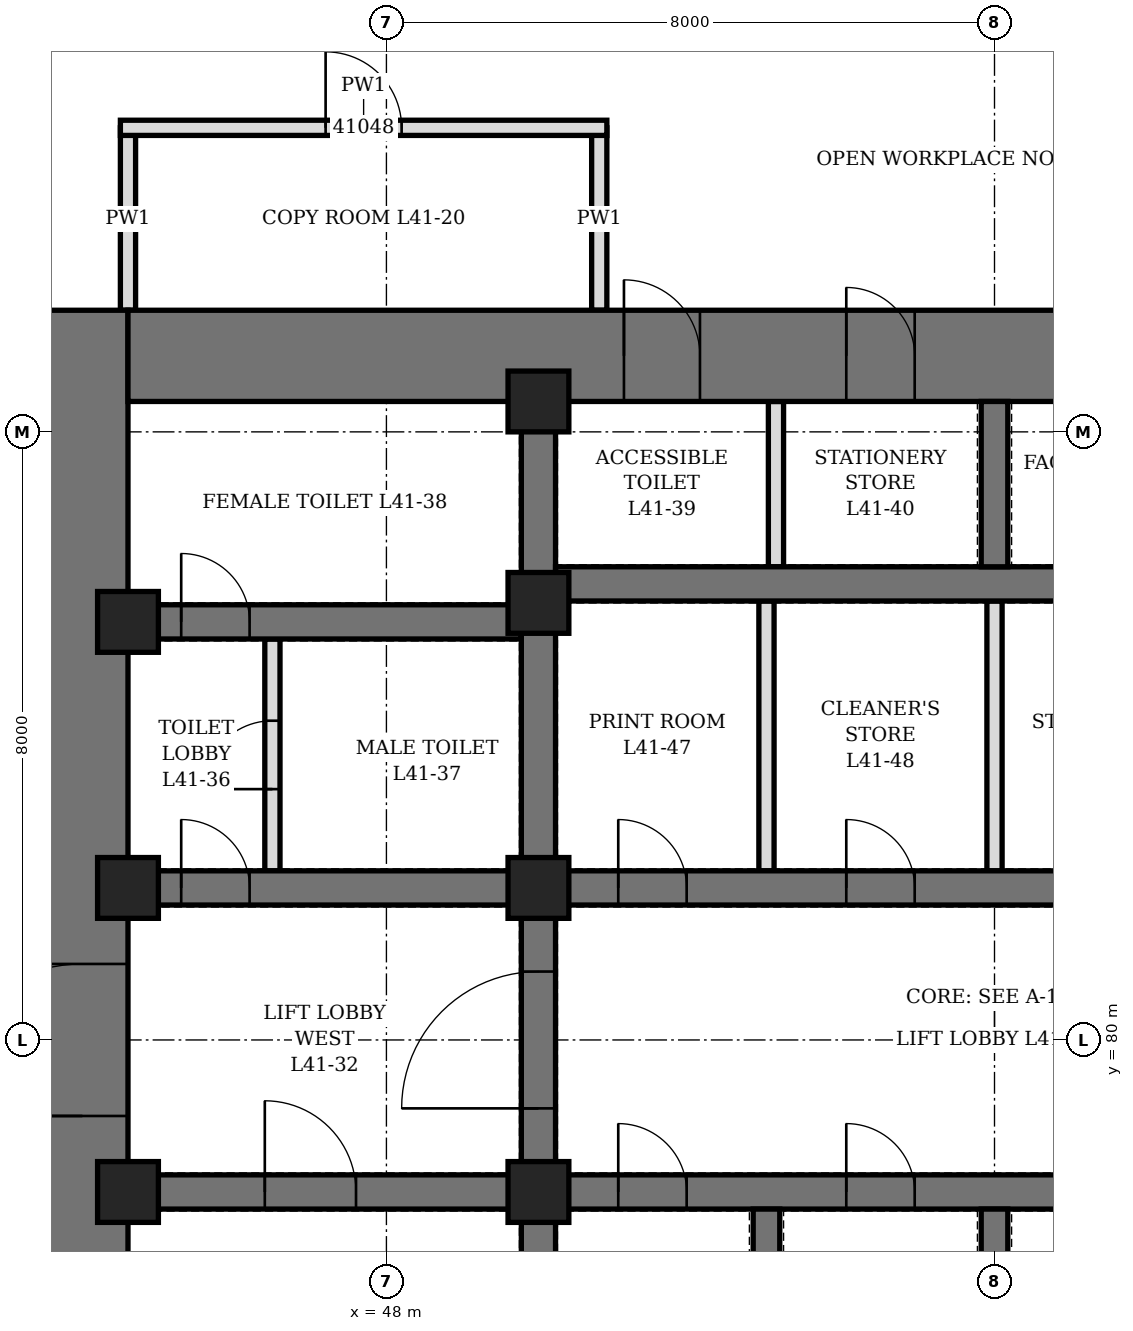
"""IFC4 building model, lengths in metres.
Left out: names, types, materials, properties, quantities, classifications, styles, units other than length and angle.
Written with IfcOpenShell. Run it as: python <this file> out.ifc"""

import sys

from ifc_helpers import new_model, si_unit, direction, frame, frame_2d, origin, origin_2d, place, context, subcontext, project, spatial, rectangle, hollow_rectangle, extrude, element, fill, save


model = new_model("IFC4")
c1 = context("Model", 3, precision=1e-05, world=origin(), true_north=direction((0.0, 1.0)))
c2 = subcontext(c1, "Body", "Model", "MODEL_VIEW")
j1 = project(units=[si_unit("LENGTHUNIT", "METRE"), si_unit("PLANEANGLEUNIT", "RADIAN")], contexts=[c1])
p1 = place(None, origin())
s1 = spatial("IfcSite", under=j1, at=p1, CompositionType="ELEMENT")
p2 = place(p1, origin())
s2 = spatial("IfcBuilding", under=s1, at=p2, CompositionType="ELEMENT")
p3 = place(p2, frame((0.0, 0.0, 185.5)))
s3 = spatial("IfcBuildingStorey", under=s2, at=p3, CompositionType="ELEMENT", Elevation=185.5)
p4 = place(p3, frame((44.0, 70.4, 0.0), z_axis=(0.0, 0.0, 1.0), x_axis=(0.0, 1.0, 0.0)))
e1 = element("IfcWall", 1, at=p4, inside=s3, PredefinedType="SHEAR", context=c2, shape_type="SweptSolid", body=[
    extrude(rectangle(XDim=19.2, YDim=1.2, at=frame_2d((9.6, 0.0))), origin(), (0.0, 0.0, 1.0), 4.2),
])
p5 = place(p4, frame((8.6, 0.0, 0.0)))
e2 = element("IfcOpeningElement", 2, at=p5, cuts=e1, PredefinedType="OPENING", context=c2, shape_type="SweptSolid", body=[
    extrude(rectangle(XDim=2.0, YDim=2.4, at=frame_2d((1.0, 1.2))), frame((0.0, 0.61, 0.0), z_axis=(0.0, -1.0, 0.0), x_axis=(1.0, 0.0, 0.0)), (0.0, 0.0, 1.0), 1.22),
])
p6 = place(p3, frame((44.6, 89.0, 0.0), z_axis=(0.0, 0.0, 1.0), x_axis=(1.0, 0.0, 0.0)))
e3 = element("IfcWall", 3, at=p6, inside=s3, PredefinedType="SHEAR", context=c2, shape_type="SweptSolid", body=[
    extrude(rectangle(XDim=22.8, YDim=1.2, at=frame_2d((11.4, 0.0))), origin(), (0.0, 0.0, 1.0), 4.2),
])
p7 = place(p6, frame((6.525, 0.0, 0.0)))
e4 = element("IfcOpeningElement", 4, at=p7, cuts=e3, PredefinedType="OPENING", context=c2, shape_type="SweptSolid", body=[
    extrude(rectangle(XDim=1.0, YDim=2.1, at=frame_2d((0.5, 1.05))), frame((0.0, 0.61, 0.0), z_axis=(0.0, -1.0, 0.0), x_axis=(1.0, 0.0, 0.0)), (0.0, 0.0, 1.0), 1.22),
])
p8 = place(p6, frame((9.45, 0.0, 0.0)))
e5 = element("IfcOpeningElement", 5, at=p8, cuts=e3, PredefinedType="OPENING", context=c2, shape_type="SweptSolid", body=[
    extrude(rectangle(XDim=0.9, YDim=2.1, at=frame_2d((0.45, 1.05))), frame((0.0, 0.61, 0.0), z_axis=(0.0, -1.0, 0.0), x_axis=(1.0, 0.0, 0.0)), (0.0, 0.0, 1.0), 1.22),
])
p9 = place(p6, frame((13.012, 0.0, 0.0)))
e6 = element("IfcOpeningElement", 6, at=p9, cuts=e3, PredefinedType="OPENING", context=c2, shape_type="SweptSolid", body=[
    extrude(rectangle(XDim=0.9, YDim=2.1, at=frame_2d((0.45, 1.05))), frame((0.0, 0.61, 0.0), z_axis=(0.0, -1.0, 0.0), x_axis=(1.0, 0.0, 0.0)), (0.0, 0.0, 1.0), 1.22),
])
p10 = place(p3, frame((50.0, 71.6, 0.0), z_axis=(0.0, 0.0, 1.0), x_axis=(0.0, 1.0, 0.0)))
e7 = element("IfcWall", 7, at=p10, inside=s3, PredefinedType="SHEAR", context=c2, shape_type="SweptSolid", body=[
    extrude(rectangle(XDim=16.8, YDim=0.45, at=frame_2d((8.4, 0.0))), origin(), (0.0, 0.0, 1.0), 4.2),
])
p11 = place(p10, frame((7.5, 0.0, 0.0)))
e8 = element("IfcOpeningElement", 8, at=p11, cuts=e7, PredefinedType="OPENING", context=c2, shape_type="SweptSolid", body=[
    extrude(rectangle(XDim=1.8, YDim=2.4, at=frame_2d((0.9, 1.2))), frame((0.0, 0.235, 0.0), z_axis=(0.0, -1.0, 0.0), x_axis=(1.0, 0.0, 0.0)), (0.0, 0.0, 1.0), 0.47),
])
p12 = place(p3, frame((44.6, 78.0, 0.0), z_axis=(0.0, 0.0, 1.0), x_axis=(1.0, 0.0, 0.0)))
e9 = element("IfcWall", 9, at=p12, inside=s3, PredefinedType="SHEAR", context=c2, shape_type="SweptSolid", body=[
    extrude(rectangle(XDim=5.175, YDim=0.45, at=frame_2d((2.587, 0.0))), origin(), (0.0, 0.0, 1.0), 4.2),
])
p13 = place(p12, frame((1.8, 0.0, 0.0)))
e10 = element("IfcOpeningElement", 10, at=p13, cuts=e9, PredefinedType="OPENING", context=c2, shape_type="SweptSolid", body=[
    extrude(rectangle(XDim=1.2, YDim=2.1, at=frame_2d((0.6, 1.05))), frame((0.0, 0.235, 0.0), z_axis=(0.0, -1.0, 0.0), x_axis=(1.0, 0.0, 0.0)), (0.0, 0.0, 1.0), 0.47),
])
p14 = place(p3, frame((44.6, 82.0, 0.0), z_axis=(0.0, 0.0, 1.0), x_axis=(1.0, 0.0, 0.0)))
e11 = element("IfcWall", 11, at=p14, inside=s3, PredefinedType="SHEAR", context=c2, shape_type="SweptSolid", body=[
    extrude(rectangle(XDim=5.175, YDim=0.45, at=frame_2d((2.587, 0.0))), origin(), (0.0, 0.0, 1.0), 4.2),
])
p15 = place(p14, frame((0.7, 0.0, 0.0)))
e12 = element("IfcOpeningElement", 12, at=p15, cuts=e11, PredefinedType="OPENING", context=c2, shape_type="SweptSolid", body=[
    extrude(rectangle(XDim=0.9, YDim=2.1, at=frame_2d((0.45, 1.05))), frame((0.0, 0.235, 0.0), z_axis=(0.0, -1.0, 0.0), x_axis=(1.0, 0.0, 0.0)), (0.0, 0.0, 1.0), 0.47),
])
p16 = place(p3, frame((44.6, 85.5, 0.0), z_axis=(0.0, 0.0, 1.0), x_axis=(1.0, 0.0, 0.0)))
e13 = element("IfcWall", 13, at=p16, inside=s3, PredefinedType="SHEAR", context=c2, shape_type="SweptSolid", body=[
    extrude(rectangle(XDim=5.175, YDim=0.45, at=frame_2d((2.587, 0.0))), origin(), (0.0, 0.0, 1.0), 4.2),
])
p17 = place(p16, frame((0.7, 0.0, 0.0)))
e14 = element("IfcOpeningElement", 14, at=p17, cuts=e13, PredefinedType="OPENING", context=c2, shape_type="SweptSolid", body=[
    extrude(rectangle(XDim=0.9, YDim=2.1, at=frame_2d((0.45, 1.05))), frame((0.0, 0.235, 0.0), z_axis=(0.0, -1.0, 0.0), x_axis=(1.0, 0.0, 0.0)), (0.0, 0.0, 1.0), 0.47),
])
p18 = place(p3, frame((50.225, 78.0, 0.0), z_axis=(0.0, 0.0, 1.0), x_axis=(1.0, 0.0, 0.0)))
e15 = element("IfcWall", 15, at=p18, inside=s3, PredefinedType="SHEAR", context=c2, shape_type="SweptSolid", body=[
    extrude(rectangle(XDim=11.55, YDim=0.45, at=frame_2d((5.775, 0.0))), origin(), (0.0, 0.0, 1.0), 4.2),
])
p19 = place(p18, frame((0.825, 0.0, 0.0)))
e16 = element("IfcOpeningElement", 16, at=p19, cuts=e15, PredefinedType="OPENING", context=c2, shape_type="SweptSolid", body=[
    extrude(rectangle(XDim=0.9, YDim=2.1, at=frame_2d((0.45, 1.05))), frame((0.0, 0.235, 0.0), z_axis=(0.0, -1.0, 0.0), x_axis=(1.0, 0.0, 0.0)), (0.0, 0.0, 1.0), 0.47),
])
p20 = place(p18, frame((3.825, 0.0, 0.0)))
e17 = element("IfcOpeningElement", 17, at=p20, cuts=e15, PredefinedType="OPENING", context=c2, shape_type="SweptSolid", body=[
    extrude(rectangle(XDim=0.9, YDim=2.1, at=frame_2d((0.45, 1.05))), frame((0.0, 0.235, 0.0), z_axis=(0.0, -1.0, 0.0), x_axis=(1.0, 0.0, 0.0)), (0.0, 0.0, 1.0), 0.47),
])
p21 = place(p18, frame((6.825, 0.0, 0.0)))
e18 = element("IfcOpeningElement", 18, at=p21, cuts=e15, PredefinedType="OPENING", context=c2, shape_type="SweptSolid", body=[
    extrude(rectangle(XDim=0.9, YDim=2.1, at=frame_2d((0.45, 1.05))), frame((0.0, 0.235, 0.0), z_axis=(0.0, -1.0, 0.0), x_axis=(1.0, 0.0, 0.0)), (0.0, 0.0, 1.0), 0.47),
])
p22 = place(p18, frame((9.825, 0.0, 0.0)))
e19 = element("IfcOpeningElement", 19, at=p22, cuts=e15, PredefinedType="OPENING", context=c2, shape_type="SweptSolid", body=[
    extrude(rectangle(XDim=0.9, YDim=2.1, at=frame_2d((0.45, 1.05))), frame((0.0, 0.235, 0.0), z_axis=(0.0, -1.0, 0.0), x_axis=(1.0, 0.0, 0.0)), (0.0, 0.0, 1.0), 0.47),
])
p23 = place(p3, frame((50.225, 82.0, 0.0), z_axis=(0.0, 0.0, 1.0), x_axis=(1.0, 0.0, 0.0)))
e20 = element("IfcWall", 20, at=p23, inside=s3, PredefinedType="SHEAR", context=c2, shape_type="SweptSolid", body=[
    extrude(rectangle(XDim=11.55, YDim=0.45, at=frame_2d((5.775, 0.0))), origin(), (0.0, 0.0, 1.0), 4.2),
])
p24 = place(p23, frame((0.825, 0.0, 0.0)))
e21 = element("IfcOpeningElement", 21, at=p24, cuts=e20, PredefinedType="OPENING", context=c2, shape_type="SweptSolid", body=[
    extrude(rectangle(XDim=0.9, YDim=2.1, at=frame_2d((0.45, 1.05))), frame((0.0, 0.235, 0.0), z_axis=(0.0, -1.0, 0.0), x_axis=(1.0, 0.0, 0.0)), (0.0, 0.0, 1.0), 0.47),
])
p25 = place(p23, frame((3.825, 0.0, 0.0)))
e22 = element("IfcOpeningElement", 22, at=p25, cuts=e20, PredefinedType="OPENING", context=c2, shape_type="SweptSolid", body=[
    extrude(rectangle(XDim=0.9, YDim=2.1, at=frame_2d((0.45, 1.05))), frame((0.0, 0.235, 0.0), z_axis=(0.0, -1.0, 0.0), x_axis=(1.0, 0.0, 0.0)), (0.0, 0.0, 1.0), 0.47),
])
p26 = place(p23, frame((6.825, 0.0, 0.0)))
e23 = element("IfcOpeningElement", 23, at=p26, cuts=e20, PredefinedType="OPENING", context=c2, shape_type="SweptSolid", body=[
    extrude(rectangle(XDim=0.9, YDim=2.1, at=frame_2d((0.45, 1.05))), frame((0.0, 0.235, 0.0), z_axis=(0.0, -1.0, 0.0), x_axis=(1.0, 0.0, 0.0)), (0.0, 0.0, 1.0), 0.47),
])
p27 = place(p23, frame((9.825, 0.0, 0.0)))
e24 = element("IfcOpeningElement", 24, at=p27, cuts=e20, PredefinedType="OPENING", context=c2, shape_type="SweptSolid", body=[
    extrude(rectangle(XDim=0.9, YDim=2.1, at=frame_2d((0.45, 1.05))), frame((0.0, 0.235, 0.0), z_axis=(0.0, -1.0, 0.0), x_axis=(1.0, 0.0, 0.0)), (0.0, 0.0, 1.0), 0.47),
])
p28 = place(p3, frame((50.225, 86.0, 0.0), z_axis=(0.0, 0.0, 1.0), x_axis=(1.0, 0.0, 0.0)))
e25 = element("IfcWall", 25, at=p28, inside=s3, PredefinedType="SHEAR", context=c2, shape_type="SweptSolid", body=[
    extrude(rectangle(XDim=11.55, YDim=0.45, at=frame_2d((5.775, 0.0))), origin(), (0.0, 0.0, 1.0), 4.2),
])
for number, where, z_axis, x_axis in (
    (26, (53.0, 74.175, 0.0), (0.0, 0.0, 1.0), (0.0, 1.0, 0.0)),
    (27, (56.0, 74.175, 0.0), (0.0, 0.0, 1.0), (0.0, 1.0, 0.0)),
):
    element("IfcWall", number, at=place(p3, frame(where, z_axis=z_axis, x_axis=x_axis)), inside=s3, PredefinedType="SHEAR", context=c2, shape_type="SweptSolid", body=[
        extrude(rectangle(XDim=3.6, YDim=0.35, at=frame_2d((1.8, 0.0))), origin(), (0.0, 0.0, 1.0), 4.2),
    ])
p29 = place(p3, frame((56.0, 86.225, 0.0), z_axis=(0.0, 0.0, 1.0), x_axis=(0.0, 1.0, 0.0)))
e28 = element("IfcWall", 28, at=p29, inside=s3, PredefinedType="SHEAR", context=c2, shape_type="SweptSolid", body=[
    extrude(rectangle(XDim=2.175, YDim=0.35, at=frame_2d((1.087, 0.0))), origin(), (0.0, 0.0, 1.0), 4.2),
])
for number, where, z_axis, x_axis in (
    (29, (44.6, 78.0, 0.0), (0.0, 0.0, 1.0), (1.0, 0.0, 0.0)),
    (30, (44.6, 82.0, 0.0), (0.0, 0.0, 1.0), (1.0, 0.0, 0.0)),
    (31, (44.6, 85.5, 0.0), (0.0, 0.0, 1.0), (1.0, 0.0, 0.0)),
    (32, (50.0, 78.0, 0.0), (0.0, 0.0, 1.0), (1.0, 0.0, 0.0)),
    (33, (50.0, 82.0, 0.0), (0.0, 0.0, 1.0), (1.0, 0.0, 0.0)),
    (34, (50.0, 85.75, 0.0), (0.0, 0.0, 1.0), (1.0, 0.0, 0.0)),
    (35, (50.0, 88.4, 0.0), (0.0, 0.0, 1.0), (1.0, 0.0, 0.0)),
):
    element("IfcColumn", number, at=place(p3, frame(where, z_axis=z_axis, x_axis=x_axis)), inside=s3, PredefinedType="COLUMN", context=c2, shape_type="SweptSolid", body=[
        extrude(hollow_rectangle(XDim=0.8, YDim=0.8, WallThickness=0.1, at=origin_2d()), origin(), (0.0, 0.0, 1.0), 4.2),
    ])
p30 = place(p3, frame((46.5, 82.225, 0.0), z_axis=(0.0, 0.0, 1.0), x_axis=(0.0, 1.0, 0.0)))
e36 = element("IfcWall", 36, at=p30, inside=s3, PredefinedType="PARTITIONING", context=c2, shape_type="SweptSolid", body=[
    extrude(rectangle(XDim=3.05, YDim=0.2, at=frame_2d((1.525, 0.0))), origin(), (0.0, 0.0, 1.0), 4.04),
])
p31 = place(p30, frame((1.075, 0.0, 0.0)))
e37 = element("IfcOpeningElement", 37, at=p31, cuts=e36, PredefinedType="OPENING", context=c2, shape_type="SweptSolid", body=[
    extrude(rectangle(XDim=0.9, YDim=2.1, at=frame_2d((0.45, 1.05))), frame((0.0, 0.11, 0.0), z_axis=(0.0, -1.0, 0.0), x_axis=(1.0, 0.0, 0.0)), (0.0, 0.0, 1.0), 0.22),
])
p32 = place(p3, frame((53.125, 86.225, 0.0), z_axis=(0.0, 0.0, 1.0), x_axis=(0.0, 1.0, 0.0)))
e38 = element("IfcWall", 38, at=p32, inside=s3, PredefinedType="PARTITIONING", context=c2, shape_type="SweptSolid", body=[
    extrude(rectangle(XDim=2.175, YDim=0.2, at=frame_2d((1.087, 0.0))), origin(), (0.0, 0.0, 1.0), 4.04),
])
p33 = place(p3, frame((53.0, 82.225, 0.0), z_axis=(0.0, 0.0, 1.0), x_axis=(0.0, 1.0, 0.0)))
e39 = element("IfcWall", 39, at=p33, inside=s3, PredefinedType="PARTITIONING", context=c2, shape_type="SweptSolid", body=[
    extrude(rectangle(XDim=3.55, YDim=0.2, at=frame_2d((1.775, 0.0))), origin(), (0.0, 0.0, 1.0), 4.04),
])
p34 = place(p3, frame((56.0, 82.225, 0.0), z_axis=(0.0, 0.0, 1.0), x_axis=(0.0, 1.0, 0.0)))
e40 = element("IfcWall", 40, at=p34, inside=s3, PredefinedType="PARTITIONING", context=c2, shape_type="SweptSolid", body=[
    extrude(rectangle(XDim=3.55, YDim=0.2, at=frame_2d((1.775, 0.0))), origin(), (0.0, 0.0, 1.0), 2.54),
])
for number, where, z_axis, x_axis in (
    (41, (44.6, 89.6, 0.0), (0.0, 0.0, 1.0), (0.0, 1.0, 0.0)),
    (42, (50.8, 89.6, 0.0), (0.0, 0.0, 1.0), (0.0, 1.0, 0.0)),
):
    element("IfcWall", number, at=place(p3, frame(where, z_axis=z_axis, x_axis=x_axis)), inside=s3, PredefinedType="PARTITIONING", context=c2, shape_type="SweptSolid", body=[
        extrude(rectangle(XDim=2.4, YDim=0.2, at=frame_2d((1.2, 0.0))), origin(), (0.0, 0.0, 1.0), 4.04),
    ])
p35 = place(p3, frame((44.5, 92.0, 0.0), z_axis=(0.0, 0.0, 1.0), x_axis=(1.0, 0.0, 0.0)))
e43 = element("IfcWall", 43, at=p35, inside=s3, PredefinedType="PARTITIONING", context=c2, shape_type="SweptSolid", body=[
    extrude(rectangle(XDim=6.4, YDim=0.2, at=frame_2d((3.2, 0.0))), origin(), (0.0, 0.0, 1.0), 4.04),
])
p36 = place(p35, frame((2.7, 0.0, 0.0)))
e44 = element("IfcOpeningElement", 44, at=p36, cuts=e43, PredefinedType="OPENING", context=c2, shape_type="SweptSolid", body=[
    extrude(rectangle(XDim=1.0, YDim=2.1, at=frame_2d((0.5, 1.05))), frame((0.0, 0.11, 0.0), z_axis=(0.0, -1.0, 0.0), x_axis=(1.0, 0.0, 0.0)), (0.0, 0.0, 1.0), 0.22),
])
p37 = place(p15, origin())
e45 = element("IfcDoor", 45, at=p37, inside=s3, OperationType="SINGLE_SWING_LEFT", PredefinedType="DOOR", context=c2, shape_type="SweptSolid", body=[
    extrude(rectangle(XDim=0.9, YDim=2.1, at=frame_2d((0.45, 1.05))), frame((0.0, 0.225, 0.0), z_axis=(0.0, -1.0, 0.0), x_axis=(1.0, 0.0, 0.0)), (0.0, 0.0, 1.0), 0.449),
])
fill(e12, e45)
p38 = place(p31, origin())
e46 = element("IfcDoor", 46, at=p38, inside=s3, OperationType="SINGLE_SWING_RIGHT", PredefinedType="DOOR", context=c2, shape_type="SweptSolid", body=[
    extrude(rectangle(XDim=0.9, YDim=2.1, at=frame_2d((0.45, 1.05))), frame((0.0, 0.1, 0.0), z_axis=(0.0, -1.0, 0.0), x_axis=(1.0, 0.0, 0.0)), (0.0, 0.0, 1.0), 0.199),
])
fill(e37, e46)
p39 = place(p17, origin())
e47 = element("IfcDoor", 47, at=p39, inside=s3, OperationType="SINGLE_SWING_RIGHT", PredefinedType="DOOR", context=c2, shape_type="SweptSolid", body=[
    extrude(rectangle(XDim=0.9, YDim=2.1, at=frame_2d((0.45, 1.05))), frame((0.0, 0.225, 0.0), z_axis=(0.0, -1.0, 0.0), x_axis=(1.0, 0.0, 0.0)), (0.0, 0.0, 1.0), 0.449),
])
fill(e14, e47)
p40 = place(p7, origin())
e48 = element("IfcDoor", 48, at=p40, inside=s3, OperationType="SINGLE_SWING_LEFT", PredefinedType="DOOR", context=c2, shape_type="SweptSolid", body=[
    extrude(rectangle(XDim=1.0, YDim=2.1, at=frame_2d((0.5, 1.05))), frame((0.0, 0.35, 0.0), z_axis=(0.0, -1.0, 0.0), x_axis=(1.0, 0.0, 0.0)), (0.0, 0.0, 1.0), 0.7),
])
fill(e4, e48)
p41 = place(p8, origin())
e49 = element("IfcDoor", 49, at=p41, inside=s3, OperationType="SINGLE_SWING_LEFT", PredefinedType="DOOR", context=c2, shape_type="SweptSolid", body=[
    extrude(rectangle(XDim=0.9, YDim=2.1, at=frame_2d((0.45, 1.05))), frame((0.0, 0.35, 0.0), z_axis=(0.0, -1.0, 0.0), x_axis=(1.0, 0.0, 0.0)), (0.0, 0.0, 1.0), 0.7),
])
fill(e5, e49)
p42 = place(p19, origin())
e50 = element("IfcDoor", 50, at=p42, inside=s3, OperationType="SINGLE_SWING_LEFT", PredefinedType="DOOR", context=c2, shape_type="SweptSolid", body=[
    extrude(rectangle(XDim=0.9, YDim=2.1, at=frame_2d((0.45, 1.05))), frame((0.0, 0.225, 0.0), z_axis=(0.0, -1.0, 0.0), x_axis=(1.0, 0.0, 0.0)), (0.0, 0.0, 1.0), 0.449),
])
fill(e16, e50)
p43 = place(p20, origin())
e51 = element("IfcDoor", 51, at=p43, inside=s3, OperationType="SINGLE_SWING_LEFT", PredefinedType="DOOR", context=c2, shape_type="SweptSolid", body=[
    extrude(rectangle(XDim=0.9, YDim=2.1, at=frame_2d((0.45, 1.05))), frame((0.0, 0.225, 0.0), z_axis=(0.0, -1.0, 0.0), x_axis=(1.0, 0.0, 0.0)), (0.0, 0.0, 1.0), 0.449),
])
fill(e17, e51)
p44 = place(p24, origin())
e52 = element("IfcDoor", 52, at=p44, inside=s3, OperationType="SINGLE_SWING_LEFT", PredefinedType="DOOR", context=c2, shape_type="SweptSolid", body=[
    extrude(rectangle(XDim=0.9, YDim=2.1, at=frame_2d((0.45, 1.05))), frame((0.0, 0.225, 0.0), z_axis=(0.0, -1.0, 0.0), x_axis=(1.0, 0.0, 0.0)), (0.0, 0.0, 1.0), 0.449),
])
fill(e21, e52)
p45 = place(p25, origin())
e53 = element("IfcDoor", 53, at=p45, inside=s3, OperationType="SINGLE_SWING_LEFT", PredefinedType="DOOR", context=c2, shape_type="SweptSolid", body=[
    extrude(rectangle(XDim=0.9, YDim=2.1, at=frame_2d((0.45, 1.05))), frame((0.0, 0.225, 0.0), z_axis=(0.0, -1.0, 0.0), x_axis=(1.0, 0.0, 0.0)), (0.0, 0.0, 1.0), 0.449),
])
fill(e22, e53)
p46 = place(p13, origin())
e54 = element("IfcDoor", 54, at=p46, inside=s3, OperationType="SINGLE_SWING_LEFT", PredefinedType="DOOR", context=c2, shape_type="SweptSolid", body=[
    extrude(rectangle(XDim=1.2, YDim=2.1, at=frame_2d((0.6, 1.05))), frame((0.0, 0.225, 0.0), z_axis=(0.0, -1.0, 0.0), x_axis=(1.0, 0.0, 0.0)), (0.0, 0.0, 1.0), 0.449),
])
fill(e10, e54)
p47 = place(p5, origin())
e55 = element("IfcDoor", 55, at=p47, inside=s3, OperationType="DOUBLE_DOOR_SINGLE_SWING", PredefinedType="DOOR", context=c2, shape_type="SweptSolid", body=[
    extrude(rectangle(XDim=2.0, YDim=2.4, at=frame_2d((1.0, 1.2))), frame((0.0, 0.35, 0.0), z_axis=(0.0, -1.0, 0.0), x_axis=(1.0, 0.0, 0.0)), (0.0, 0.0, 1.0), 0.7),
])
fill(e2, e55)
p48 = place(p11, origin())
e56 = element("IfcDoor", 56, at=p48, inside=s3, OperationType="DOUBLE_DOOR_SINGLE_SWING", PredefinedType="DOOR", context=c2, shape_type="SweptSolid", body=[
    extrude(rectangle(XDim=1.8, YDim=2.4, at=frame_2d((0.9, 1.2))), frame((0.0, 0.225, 0.0), z_axis=(0.0, -1.0, 0.0), x_axis=(1.0, 0.0, 0.0)), (0.0, 0.0, 1.0), 0.449),
])
fill(e8, e56)
p49 = place(p36, origin())
e57 = element("IfcDoor", 57, at=p49, inside=s3, OperationType="SINGLE_SWING_LEFT", PredefinedType="DOOR", context=c2, shape_type="SweptSolid", body=[
    extrude(rectangle(XDim=1.0, YDim=2.1, at=frame_2d((0.5, 1.05))), frame((0.0, 0.1, 0.0), z_axis=(0.0, -1.0, 0.0), x_axis=(1.0, 0.0, 0.0)), (0.0, 0.0, 1.0), 0.199),
])
fill(e44, e57)
save(model, sys.argv[1])
